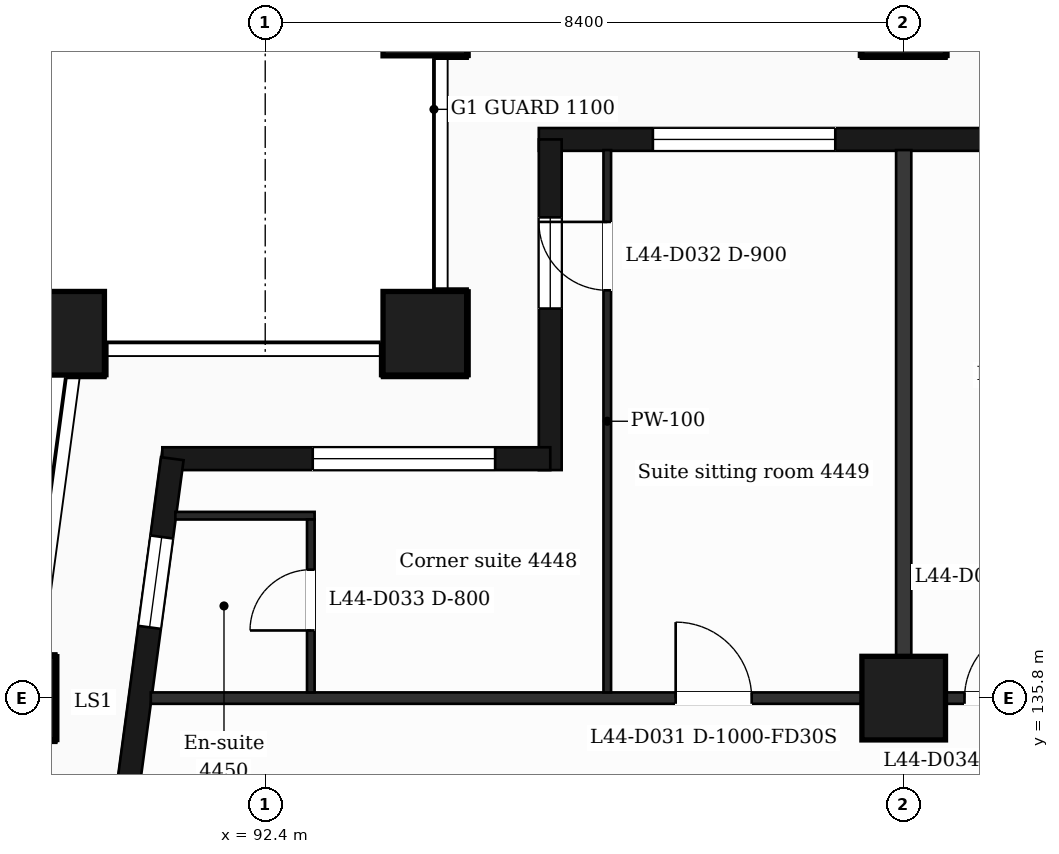
"""IFC4 building model, lengths in metres.
Left out: names, types, materials, properties, quantities, classifications, styles, units other than length and angle.
Written with IfcOpenShell. Run it as: python <this file> out.ifc"""

import sys

from ifc_helpers import new_model, si_unit, direction, frame, frame_2d, origin, origin_2d, place, context, subcontext, project, spatial, rectangle, extrude, element, fill, save


model = new_model("IFC4")
c1 = context("Model", 3, precision=1e-05, world=origin(), true_north=direction((0.0, 1.0)))
c2 = subcontext(c1, "Body", "Model", "MODEL_VIEW")
j1 = project(units=[si_unit("LENGTHUNIT", "METRE"), si_unit("PLANEANGLEUNIT", "RADIAN")], contexts=[c1])
p1 = place(None, origin())
s1 = spatial("IfcSite", under=j1, at=p1, CompositionType="ELEMENT")
p2 = place(p1, origin())
s2 = spatial("IfcBuilding", under=s1, at=p2, CompositionType="ELEMENT")
p3 = place(p2, frame((0.0, 0.0, 184.8)))
s3 = spatial("IfcBuildingStorey", under=s2, at=p3, CompositionType="ELEMENT", Elevation=184.8)
for number, where, z_axis, x_axis in (
    (1, (94.5, 140.6, 0.0), (0.0, 0.0, 1.0), (1.0, 0.0, 0.0)),
    (2, (89.735, 140.6, 0.0), (0.0, 0.0, 1.0), (1.0, 0.0, 0.0)),
    (3, (100.8, 135.8, 0.0), (0.0, 0.0, 1.0), (1.0, 0.0, 0.0)),
    (4, (89.088, 135.8, 0.0), (0.0, 0.0, 1.0), (1.0, 0.0, 0.0)),
    (5, (100.8, 144.8, 0.0), (0.0, 0.0, 1.0), (1.0, 0.0, 0.0)),
    (6, (94.5, 144.8, 0.0), (0.0, 0.0, 1.0), (1.0, 0.0, 0.0)),
):
    element("IfcColumn", number, at=place(p3, frame(where, z_axis=z_axis, x_axis=x_axis)), inside=s3, PredefinedType="COLUMN", context=c2, shape_type="SweptSolid", body=[
        extrude(rectangle(XDim=1.1, YDim=1.1, at=origin_2d()), origin(), (0.0, 0.0, 1.0), 3.7),
    ])
p4 = place(p3, frame((110.4, 143.15, 0.0), z_axis=(0.0, 0.0, 1.0), x_axis=(-1.0, 0.0, 0.0)))
e7 = element("IfcWall", 7, at=p4, inside=s3, PredefinedType="SOLIDWALL", context=c2, shape_type="SweptSolid", body=[
    extrude(rectangle(XDim=14.4, YDim=0.3, at=frame_2d((7.2, 0.0))), origin(), (0.0, 0.0, 1.0), 3.38),
])
p5 = place(p4, frame((2.7, 0.0, 0.9)))
e8 = element("IfcOpeningElement", 8, at=p5, cuts=e7, PredefinedType="OPENING", context=c2, shape_type="SweptSolid", body=[
    extrude(rectangle(XDim=1.2, YDim=2.1, at=frame_2d((0.6, 1.05))), frame((0.0, 0.16, 0.0), z_axis=(0.0, -1.0, 0.0), x_axis=(1.0, 0.0, 0.0)), (0.0, 0.0, 1.0), 0.32),
])
p6 = place(p4, frame((6.9, 0.0, 0.0)))
e9 = element("IfcOpeningElement", 9, at=p6, cuts=e7, PredefinedType="OPENING", context=c2, shape_type="SweptSolid", body=[
    extrude(rectangle(XDim=1.2, YDim=2.4, at=frame_2d((0.6, 1.2))), frame((0.0, 0.16, 0.0), z_axis=(0.0, -1.0, 0.0), x_axis=(1.0, 0.0, 0.0)), (0.0, 0.0, 1.0), 0.32),
])
p7 = place(p4, frame((10.5, 0.0, 0.9)))
e10 = element("IfcOpeningElement", 10, at=p7, cuts=e7, PredefinedType="OPENING", context=c2, shape_type="SweptSolid", body=[
    extrude(rectangle(XDim=2.4, YDim=2.1, at=frame_2d((1.2, 1.05))), frame((0.0, 0.16, 0.0), z_axis=(0.0, -1.0, 0.0), x_axis=(1.0, 0.0, 0.0)), (0.0, 0.0, 1.0), 0.32),
])
p8 = place(p3, frame((96.15, 143.15, 0.0), z_axis=(0.0, 0.0, 1.0), x_axis=(0.0, -1.0, 0.0)))
e11 = element("IfcWall", 11, at=p8, inside=s3, PredefinedType="SOLIDWALL", context=c2, shape_type="SweptSolid", body=[
    extrude(rectangle(XDim=4.35, YDim=0.3, at=frame_2d((2.175, 0.0))), origin(), (0.0, 0.0, 1.0), 3.38),
])
p9 = place(p8, frame((1.025, 0.0, 0.9)))
e12 = element("IfcOpeningElement", 12, at=p9, cuts=e11, PredefinedType="OPENING", context=c2, shape_type="SweptSolid", body=[
    extrude(rectangle(XDim=1.2, YDim=2.1, at=frame_2d((0.6, 1.05))), frame((0.0, 0.16, 0.0), z_axis=(0.0, -1.0, 0.0), x_axis=(1.0, 0.0, 0.0)), (0.0, 0.0, 1.0), 0.32),
])
p10 = place(p3, frame((96.15, 138.95, 0.0), z_axis=(0.0, 0.0, 1.0), x_axis=(-1.0, 0.0, 0.0)))
e13 = element("IfcWall", 13, at=p10, inside=s3, PredefinedType="SOLIDWALL", context=c2, shape_type="SweptSolid", body=[
    extrude(rectangle(XDim=5.104, YDim=0.3, at=frame_2d((2.552, 0.0))), origin(), (0.0, 0.0, 1.0), 3.38),
])
p11 = place(p10, frame((0.725, 0.0, 0.9)))
e14 = element("IfcOpeningElement", 14, at=p11, cuts=e13, PredefinedType="OPENING", context=c2, shape_type="SweptSolid", body=[
    extrude(rectangle(XDim=2.4, YDim=2.1, at=frame_2d((1.2, 1.05))), frame((0.0, 0.16, 0.0), z_axis=(0.0, -1.0, 0.0), x_axis=(1.0, 0.0, 0.0)), (0.0, 0.0, 1.0), 0.32),
])
p12 = place(p3, frame((91.177, 138.95, 0.0), z_axis=(0.0, 0.0, 1.0), x_axis=(-0.133426664613, -0.991058689065, 0.0)))
e15 = element("IfcWall", 15, at=p12, inside=s3, PredefinedType="SOLIDWALL", context=c2, shape_type="SweptSolid", body=[
    extrude(rectangle(XDim=6.609, YDim=0.3, at=frame_2d((3.305, 0.0))), origin(), (0.0, 0.0, 1.0), 3.38),
])
p13 = place(p12, frame((1.039, 0.0, 0.9)))
e16 = element("IfcOpeningElement", 16, at=p13, cuts=e15, PredefinedType="OPENING", context=c2, shape_type="SweptSolid", body=[
    extrude(rectangle(XDim=1.2, YDim=2.1, at=frame_2d((0.6, 1.05))), frame((0.0, 0.16, 0.0), z_axis=(0.0, -1.0, 0.0), x_axis=(1.0, 0.0, 0.0)), (0.0, 0.0, 1.0), 0.32),
])
p14 = place(p12, frame((4.294, 0.0, 0.0)))
e17 = element("IfcOpeningElement", 17, at=p14, cuts=e15, PredefinedType="OPENING", context=c2, shape_type="SweptSolid", body=[
    extrude(rectangle(XDim=1.2, YDim=2.4, at=frame_2d((0.6, 1.2))), frame((0.0, 0.16, 0.0), z_axis=(0.0, -1.0, 0.0), x_axis=(1.0, 0.0, 0.0)), (0.0, 0.0, 1.0), 0.32),
])
p15 = place(p3, frame((90.895, 135.8, 0.0), z_axis=(0.0, 0.0, 1.0), x_axis=(1.0, 0.0, 0.0)))
e18 = element("IfcWall", 18, at=p15, inside=s3, PredefinedType="PARTITIONING", context=c2, shape_type="SweptSolid", body=[
    extrude(rectangle(XDim=45.011, YDim=0.15, at=frame_2d((22.505, 0.0))), origin(), (0.0, 0.0, 1.0), 3.38),
])
p16 = place(p15, frame((6.906, 0.0, 0.0)))
e19 = element("IfcOpeningElement", 19, at=p16, cuts=e18, PredefinedType="OPENING", context=c2, shape_type="SweptSolid", body=[
    extrude(rectangle(XDim=1.0, YDim=2.1, at=frame_2d((0.5, 1.05))), frame((0.0, 0.085, 0.0), z_axis=(0.0, -1.0, 0.0), x_axis=(1.0, 0.0, 0.0)), (0.0, 0.0, 1.0), 0.17),
])
p17 = place(p15, frame((10.705, 0.0, 0.0)))
e20 = element("IfcOpeningElement", 20, at=p17, cuts=e18, PredefinedType="OPENING", context=c2, shape_type="SweptSolid", body=[
    extrude(rectangle(XDim=0.95, YDim=2.1, at=frame_2d((0.475, 1.05))), frame((0.0, 0.085, 0.0), z_axis=(0.0, -1.0, 0.0), x_axis=(1.0, 0.0, 0.0)), (0.0, 0.0, 1.0), 0.17),
])
p18 = place(p15, frame((16.555, 0.0, 0.0)))
e21 = element("IfcOpeningElement", 21, at=p18, cuts=e18, PredefinedType="OPENING", context=c2, shape_type="SweptSolid", body=[
    extrude(rectangle(XDim=0.95, YDim=2.1, at=frame_2d((0.475, 1.05))), frame((0.0, 0.085, 0.0), z_axis=(0.0, -1.0, 0.0), x_axis=(1.0, 0.0, 0.0)), (0.0, 0.0, 1.0), 0.17),
])
p19 = place(p15, frame((21.095, 0.0, 0.0)))
e22 = element("IfcOpeningElement", 22, at=p19, cuts=e18, PredefinedType="OPENING", context=c2, shape_type="SweptSolid", body=[
    extrude(rectangle(XDim=1.0, YDim=2.1, at=frame_2d((0.5, 1.05))), frame((0.0, 0.085, 0.0), z_axis=(0.0, -1.0, 0.0), x_axis=(1.0, 0.0, 0.0)), (0.0, 0.0, 1.0), 0.17),
])
p20 = place(p15, frame((30.406, 0.0, 0.0)))
e23 = element("IfcOpeningElement", 23, at=p20, cuts=e18, PredefinedType="OPENING", context=c2, shape_type="SweptSolid", body=[
    extrude(rectangle(XDim=1.0, YDim=2.1, at=frame_2d((0.5, 1.05))), frame((0.0, 0.085, 0.0), z_axis=(0.0, -1.0, 0.0), x_axis=(1.0, 0.0, 0.0)), (0.0, 0.0, 1.0), 0.17),
])
p21 = place(p15, frame((39.814, 0.0, 0.0)))
e24 = element("IfcOpeningElement", 24, at=p21, cuts=e18, PredefinedType="OPENING", context=c2, shape_type="SweptSolid", body=[
    extrude(rectangle(XDim=0.95, YDim=2.1, at=frame_2d((0.475, 1.05))), frame((0.0, 0.085, 0.0), z_axis=(0.0, -1.0, 0.0), x_axis=(1.0, 0.0, 0.0)), (0.0, 0.0, 1.0), 0.17),
])
p22 = place(p3, frame((91.218, 138.2, 0.0), z_axis=(0.0, 0.0, 1.0), x_axis=(1.0, 0.0, 0.0)))
e25 = element("IfcWall", 25, at=p22, inside=s3, PredefinedType="PARTITIONING", context=c2, shape_type="SweptSolid", body=[
    extrude(rectangle(XDim=1.832, YDim=0.1, at=frame_2d((0.916, 0.0))), origin(), (0.0, 0.0, 1.0), 3.38),
])
p23 = place(p3, frame((93.0, 135.875, 0.0), z_axis=(0.0, 0.0, 1.0), x_axis=(0.0, 1.0, 0.0)))
e26 = element("IfcWall", 26, at=p23, inside=s3, PredefinedType="PARTITIONING", context=c2, shape_type="SweptSolid", body=[
    extrude(rectangle(XDim=2.275, YDim=0.1, at=frame_2d((1.137, 0.0))), origin(), (0.0, 0.0, 1.0), 3.38),
])
p24 = place(p23, frame((0.815, 0.0, 0.0)))
e27 = element("IfcOpeningElement", 27, at=p24, cuts=e26, PredefinedType="OPENING", context=c2, shape_type="SweptSolid", body=[
    extrude(rectangle(XDim=0.8, YDim=2.1, at=frame_2d((0.4, 1.05))), frame((0.0, 0.06, 0.0), z_axis=(0.0, -1.0, 0.0), x_axis=(1.0, 0.0, 0.0)), (0.0, 0.0, 1.0), 0.12),
])
p25 = place(p3, frame((96.9, 135.875, 0.0), z_axis=(0.0, 0.0, 1.0), x_axis=(0.0, 1.0, 0.0)))
e28 = element("IfcWall", 28, at=p25, inside=s3, PredefinedType="PARTITIONING", context=c2, shape_type="SweptSolid", body=[
    extrude(rectangle(XDim=7.135, YDim=0.1, at=frame_2d((3.567, 0.0))), origin(), (0.0, 0.0, 1.0), 3.38),
])
p26 = place(p25, frame((5.29, 0.0, 0.0)))
e29 = element("IfcOpeningElement", 29, at=p26, cuts=e28, PredefinedType="OPENING", context=c2, shape_type="SweptSolid", body=[
    extrude(rectangle(XDim=0.9, YDim=2.1, at=frame_2d((0.45, 1.05))), frame((0.0, 0.06, 0.0), z_axis=(0.0, -1.0, 0.0), x_axis=(1.0, 0.0, 0.0)), (0.0, 0.0, 1.0), 0.12),
])
p27 = place(p3, frame((100.8, 135.875, 0.0), z_axis=(0.0, 0.0, 1.0), x_axis=(0.0, 1.0, 0.0)))
e30 = element("IfcWall", 30, at=p27, inside=s3, PredefinedType="PARTITIONING", context=c2, shape_type="SweptSolid", body=[
    extrude(rectangle(XDim=7.135, YDim=0.2, at=frame_2d((3.567, 0.0))), origin(), (0.0, 0.0, 1.0), 3.38),
])
p28 = place(p7, origin())
e31 = element("IfcWindow", 31, at=p28, inside=s3, PartitioningType="SINGLE_PANEL", PredefinedType="WINDOW", context=c2, shape_type="SweptSolid", body=[
    extrude(rectangle(XDim=2.4, YDim=2.1, at=frame_2d((1.2, 1.05))), frame((0.0, 0.03, 0.0), z_axis=(0.0, -1.0, 0.0), x_axis=(1.0, 0.0, 0.0)), (0.0, 0.0, 1.0), 0.06),
])
fill(e10, e31)
p29 = place(p9, origin())
e32 = element("IfcWindow", 32, at=p29, inside=s3, PartitioningType="SINGLE_PANEL", PredefinedType="WINDOW", context=c2, shape_type="SweptSolid", body=[
    extrude(rectangle(XDim=1.2, YDim=2.1, at=frame_2d((0.6, 1.05))), frame((0.0, 0.03, 0.0), z_axis=(0.0, -1.0, 0.0), x_axis=(1.0, 0.0, 0.0)), (0.0, 0.0, 1.0), 0.06),
])
fill(e12, e32)
p30 = place(p11, origin())
e33 = element("IfcWindow", 33, at=p30, inside=s3, PartitioningType="SINGLE_PANEL", PredefinedType="WINDOW", context=c2, shape_type="SweptSolid", body=[
    extrude(rectangle(XDim=2.4, YDim=2.1, at=frame_2d((1.2, 1.05))), frame((0.0, 0.03, 0.0), z_axis=(0.0, -1.0, 0.0), x_axis=(1.0, 0.0, 0.0)), (0.0, 0.0, 1.0), 0.06),
])
fill(e14, e33)
p31 = place(p13, origin())
e34 = element("IfcWindow", 34, at=p31, inside=s3, PartitioningType="SINGLE_PANEL", PredefinedType="WINDOW", context=c2, shape_type="SweptSolid", body=[
    extrude(rectangle(XDim=1.2, YDim=2.1, at=frame_2d((0.6, 1.05))), frame((0.0, 0.03, 0.0), z_axis=(0.0, -1.0, 0.0), x_axis=(1.0, 0.0, 0.0)), (0.0, 0.0, 1.0), 0.06),
])
fill(e16, e34)
p32 = place(p16, origin())
e35 = element("IfcDoor", 35, at=p32, inside=s3, OperationType="SINGLE_SWING_LEFT", PredefinedType="DOOR", context=c2, shape_type="SweptSolid", body=[
    extrude(rectangle(XDim=1.0, YDim=2.1, at=frame_2d((0.5, 1.05))), frame((0.0, 0.025, 0.0), z_axis=(0.0, -1.0, 0.0), x_axis=(1.0, 0.0, 0.0)), (0.0, 0.0, 1.0), 0.05),
])
fill(e19, e35)
p33 = place(p26, origin())
e36 = element("IfcDoor", 36, at=p33, inside=s3, OperationType="SINGLE_SWING_RIGHT", PredefinedType="DOOR", context=c2, shape_type="SweptSolid", body=[
    extrude(rectangle(XDim=0.9, YDim=2.1, at=frame_2d((0.45, 1.05))), frame((0.0, 0.025, 0.0), z_axis=(0.0, -1.0, 0.0), x_axis=(1.0, 0.0, 0.0)), (0.0, 0.0, 1.0), 0.05),
])
fill(e29, e36)
p34 = place(p24, origin())
e37 = element("IfcDoor", 37, at=p34, inside=s3, OperationType="SINGLE_SWING_LEFT", PredefinedType="DOOR", context=c2, shape_type="SweptSolid", body=[
    extrude(rectangle(XDim=0.8, YDim=2.1, at=frame_2d((0.4, 1.05))), frame((0.0, 0.025, 0.0), z_axis=(0.0, -1.0, 0.0), x_axis=(1.0, 0.0, 0.0)), (0.0, 0.0, 1.0), 0.05),
])
fill(e27, e37)
p35 = place(p17, origin())
e38 = element("IfcDoor", 38, at=p35, inside=s3, OperationType="SINGLE_SWING_RIGHT", PredefinedType="DOOR", context=c2, shape_type="SweptSolid", body=[
    extrude(rectangle(XDim=0.95, YDim=2.1, at=frame_2d((0.475, 1.05))), frame((0.0, 0.025, 0.0), z_axis=(0.0, -1.0, 0.0), x_axis=(1.0, 0.0, 0.0)), (0.0, 0.0, 1.0), 0.05),
])
fill(e20, e38)
save(model, sys.argv[1])
